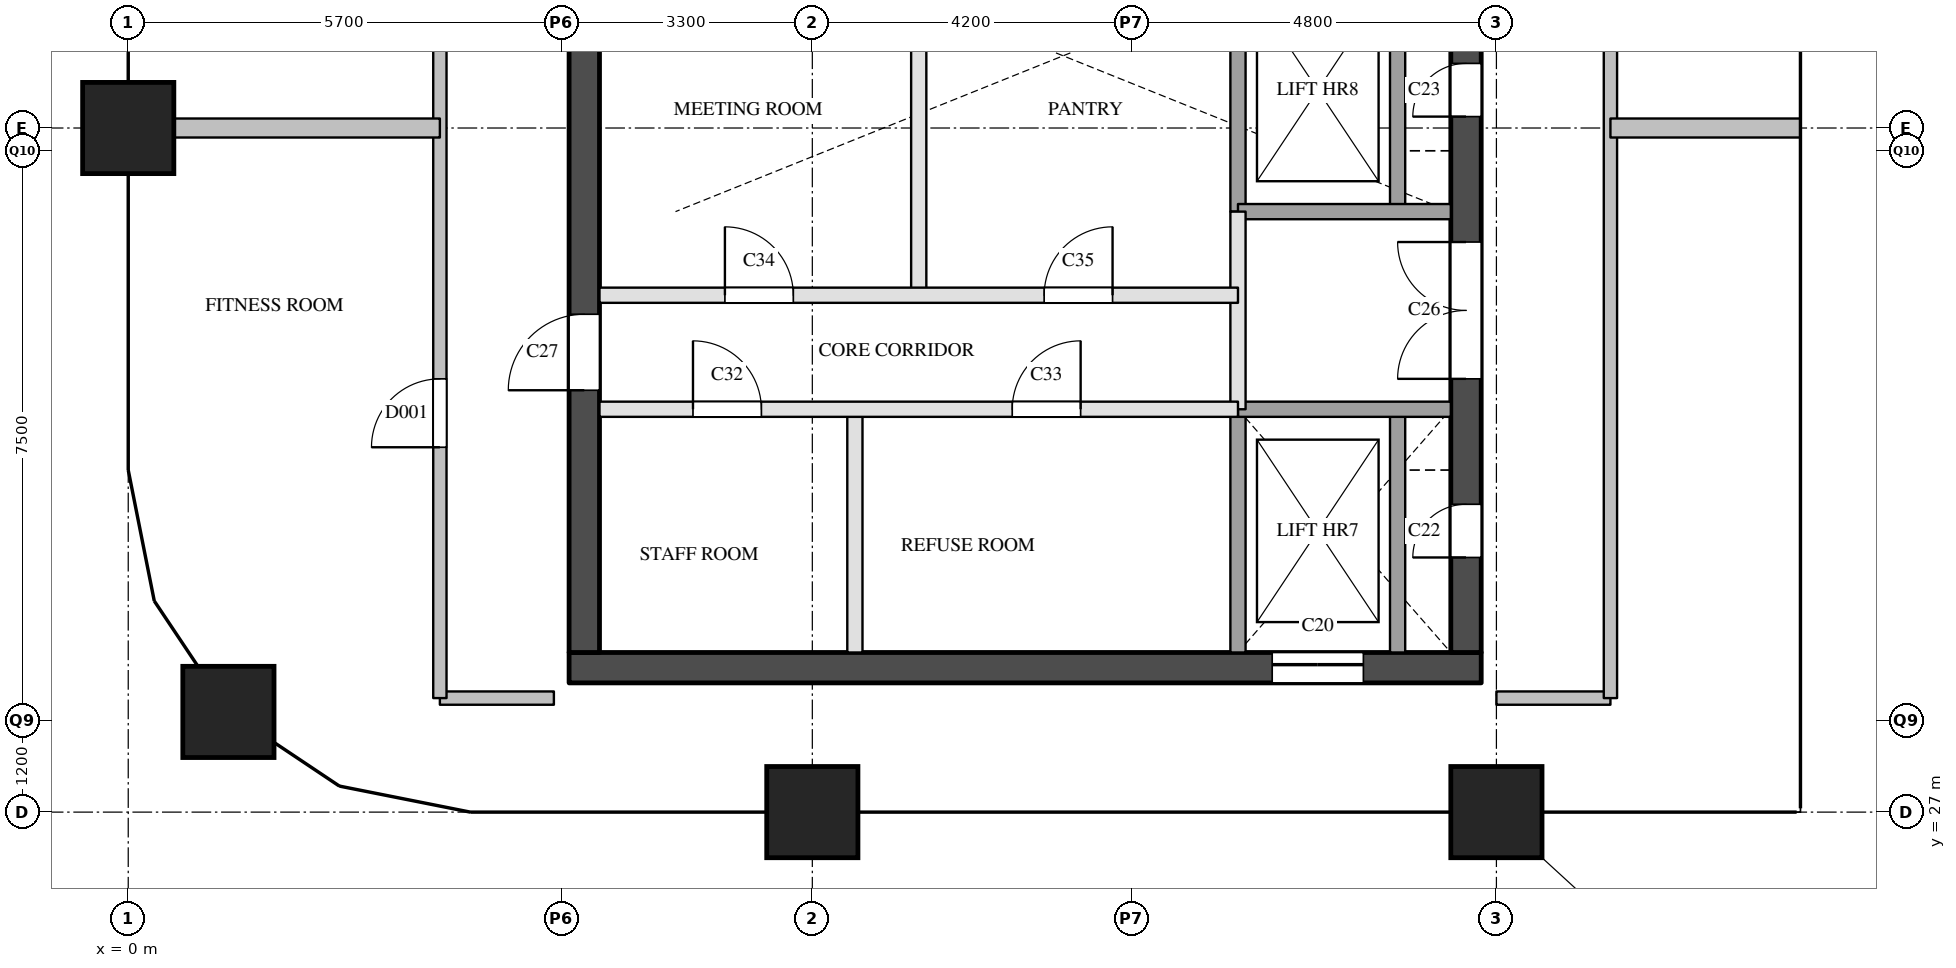
"""IFC4 building model, lengths in metres.
Left out: names, types, materials, properties, quantities, classifications, styles, units other than length and angle.
Written with IfcOpenShell. Run it as: python <this file> out.ifc"""

import sys

from ifc_helpers import new_model, si_unit, direction, frame, frame_2d, origin, origin_2d, place, context, subcontext, project, spatial, rectangle, extrude, element, fill, save


model = new_model("IFC4")
c1 = context("Model", 3, precision=1e-05, world=origin(), true_north=direction((0.0, 1.0)))
c2 = subcontext(c1, "Body", "Model", "MODEL_VIEW")
j1 = project(units=[si_unit("LENGTHUNIT", "METRE"), si_unit("PLANEANGLEUNIT", "RADIAN")], contexts=[c1])
p1 = place(None, origin())
s1 = spatial("IfcSite", under=j1, at=p1, CompositionType="ELEMENT")
p2 = place(p1, origin())
s2 = spatial("IfcBuilding", under=s1, at=p2, CompositionType="ELEMENT")
p3 = place(p2, frame((0.0, 0.0, 211.1)))
s3 = spatial("IfcBuildingStorey", under=s2, at=p3, CompositionType="ELEMENT", Elevation=211.1)
for number, where, z_axis, x_axis in (
    (1, (1.318, 28.318, 0.0), (0.0, 0.0, 1.0), (1.0, 0.0, 0.0)),
    (2, (0.0, 36.0, 0.0), (0.0, 0.0, 1.0), (1.0, 0.0, 0.0)),
    (3, (9.0, 27.0, 0.0), (0.0, 0.0, 1.0), (1.0, 0.0, 0.0)),
    (4, (18.0, 27.0, 0.0), (0.0, 0.0, 1.0), (1.0, 0.0, 0.0)),
):
    element("IfcColumn", number, at=place(p3, frame(where, z_axis=z_axis, x_axis=x_axis)), inside=s3, PredefinedType="COLUMN", context=c2, shape_type="SweptSolid", body=[
        extrude(rectangle(XDim=1.2, YDim=1.2, at=origin_2d()), origin(), (0.0, 0.0, 1.0), 3.9),
    ])
p4 = place(p3, frame((5.8, 28.9, 0.0), z_axis=(0.0, 0.0, 1.0), x_axis=(1.0, 0.0, 0.0)))
e5 = element("IfcWall", 5, at=p4, inside=s3, PredefinedType="SHEAR", context=c2, shape_type="SweptSolid", body=[
    extrude(rectangle(XDim=12.0, YDim=0.4, at=frame_2d((6.0, 0.0))), origin(), (0.0, 0.0, 1.0), 3.6),
])
p5 = place(p4, frame((9.25, 0.0, 0.0)))
e6 = element("IfcOpeningElement", 6, at=p5, cuts=e5, PredefinedType="OPENING", context=c2, shape_type="SweptSolid", body=[
    extrude(rectangle(XDim=1.2, YDim=2.1, at=frame_2d((0.6, 1.05))), frame((0.0, 0.21, 0.0), z_axis=(0.0, -1.0, 0.0), x_axis=(1.0, 0.0, 0.0)), (0.0, 0.0, 1.0), 0.42),
])
p6 = place(p3, frame((6.0, 29.1, 0.0), z_axis=(0.0, 0.0, 1.0), x_axis=(0.0, 1.0, 0.0)))
e7 = element("IfcWall", 7, at=p6, inside=s3, PredefinedType="SHEAR", context=c2, shape_type="SweptSolid", body=[
    extrude(rectangle(XDim=20.3, YDim=0.4, at=frame_2d((10.15, 0.0))), origin(), (0.0, 0.0, 1.0), 3.6),
])
p7 = place(p6, frame((3.45, 0.0, 0.0)))
e8 = element("IfcOpeningElement", 8, at=p7, cuts=e7, PredefinedType="OPENING", context=c2, shape_type="SweptSolid", body=[
    extrude(rectangle(XDim=1.0, YDim=2.1, at=frame_2d((0.5, 1.05))), frame((0.0, 0.21, 0.0), z_axis=(0.0, -1.0, 0.0), x_axis=(1.0, 0.0, 0.0)), (0.0, 0.0, 1.0), 0.42),
])
p8 = place(p6, frame((16.4, 0.0, 0.0)))
e9 = element("IfcOpeningElement", 9, at=p8, cuts=e7, PredefinedType="OPENING", context=c2, shape_type="SweptSolid", body=[
    extrude(rectangle(XDim=1.0, YDim=2.1, at=frame_2d((0.5, 1.05))), frame((0.0, 0.21, 0.0), z_axis=(0.0, -1.0, 0.0), x_axis=(1.0, 0.0, 0.0)), (0.0, 0.0, 1.0), 0.42),
])
p9 = place(p3, frame((17.6, 29.1, 0.0), z_axis=(0.0, 0.0, 1.0), x_axis=(0.0, 1.0, 0.0)))
e10 = element("IfcWall", 10, at=p9, inside=s3, PredefinedType="SHEAR", context=c2, shape_type="SweptSolid", body=[
    extrude(rectangle(XDim=20.3, YDim=0.4, at=frame_2d((10.15, 0.0))), origin(), (0.0, 0.0, 1.0), 3.6),
])
p10 = place(p9, frame((1.25, 0.0, 0.0)))
e11 = element("IfcOpeningElement", 11, at=p10, cuts=e10, PredefinedType="OPENING", context=c2, shape_type="SweptSolid", body=[
    extrude(rectangle(XDim=0.7, YDim=2.1, at=frame_2d((0.35, 1.05))), frame((0.0, 0.21, 0.0), z_axis=(0.0, -1.0, 0.0), x_axis=(1.0, 0.0, 0.0)), (0.0, 0.0, 1.0), 0.42),
])
p11 = place(p9, frame((7.05, 0.0, 0.0)))
e12 = element("IfcOpeningElement", 12, at=p11, cuts=e10, PredefinedType="OPENING", context=c2, shape_type="SweptSolid", body=[
    extrude(rectangle(XDim=0.7, YDim=2.1, at=frame_2d((0.35, 1.05))), frame((0.0, 0.21, 0.0), z_axis=(0.0, -1.0, 0.0), x_axis=(1.0, 0.0, 0.0)), (0.0, 0.0, 1.0), 0.42),
])
p12 = place(p9, frame((3.6, 0.0, 0.0)))
e13 = element("IfcOpeningElement", 13, at=p12, cuts=e10, PredefinedType="OPENING", context=c2, shape_type="SweptSolid", body=[
    extrude(rectangle(XDim=1.8, YDim=2.1, at=frame_2d((0.9, 1.05))), frame((0.0, 0.21, 0.0), z_axis=(0.0, -1.0, 0.0), x_axis=(1.0, 0.0, 0.0)), (0.0, 0.0, 1.0), 0.42),
])
p13 = place(p3, frame((9.56, 29.1, 0.0), z_axis=(0.0, 0.0, 1.0), x_axis=(0.0, 1.0, 0.0)))
e14 = element("IfcWall", 14, at=p13, inside=s3, PredefinedType="PARTITIONING", context=c2, shape_type="SweptSolid", body=[
    extrude(rectangle(XDim=3.2, YDim=0.2, at=frame_2d((1.6, 0.0))), origin(), (0.0, 0.0, 1.0), 3.6),
])
p14 = place(p3, frame((10.4, 33.8, 0.0), z_axis=(0.0, 0.0, 1.0), x_axis=(0.0, 1.0, 0.0)))
e15 = element("IfcWall", 15, at=p14, inside=s3, PredefinedType="PARTITIONING", context=c2, shape_type="SweptSolid", body=[
    extrude(rectangle(XDim=4.3, YDim=0.2, at=frame_2d((2.15, 0.0))), origin(), (0.0, 0.0, 1.0), 3.6),
])
p15 = place(p3, frame((14.6, 32.3, 0.0), z_axis=(0.0, 0.0, 1.0), x_axis=(0.0, 1.0, 0.0)))
e16 = element("IfcWall", 16, at=p15, inside=s3, PredefinedType="PARTITIONING", context=c2, shape_type="SweptSolid", body=[
    extrude(rectangle(XDim=2.6, YDim=0.2, at=frame_2d((1.3, 0.0))), origin(), (0.0, 0.0, 1.0), 3.6),
])
p16 = place(p3, frame((14.6, 29.1, 0.0), z_axis=(0.0, 0.0, 1.0), x_axis=(0.0, 1.0, 0.0)))
e17 = element("IfcWall", 17, at=p16, inside=s3, PredefinedType="SOLIDWALL", context=c2, shape_type="SweptSolid", body=[
    extrude(rectangle(XDim=3.2, YDim=0.2, at=frame_2d((1.6, 0.0))), origin(), (0.0, 0.0, 1.0), 3.6),
])
p17 = place(p3, frame((14.6, 34.9, 0.0), z_axis=(0.0, 0.0, 1.0), x_axis=(0.0, 1.0, 0.0)))
e18 = element("IfcWall", 18, at=p17, inside=s3, PredefinedType="SOLIDWALL", context=c2, shape_type="SweptSolid", body=[
    extrude(rectangle(XDim=3.2, YDim=0.2, at=frame_2d((1.6, 0.0))), origin(), (0.0, 0.0, 1.0), 3.6),
])
p18 = place(p3, frame((16.7, 29.1, 0.0), z_axis=(0.0, 0.0, 1.0), x_axis=(0.0, 1.0, 0.0)))
e19 = element("IfcWall", 19, at=p18, inside=s3, PredefinedType="SOLIDWALL", context=c2, shape_type="SweptSolid", body=[
    extrude(rectangle(XDim=3.2, YDim=0.2, at=frame_2d((1.6, 0.0))), origin(), (0.0, 0.0, 1.0), 3.6),
])
p19 = place(p3, frame((16.7, 34.9, 0.0), z_axis=(0.0, 0.0, 1.0), x_axis=(0.0, 1.0, 0.0)))
e20 = element("IfcWall", 20, at=p19, inside=s3, PredefinedType="SOLIDWALL", context=c2, shape_type="SweptSolid", body=[
    extrude(rectangle(XDim=3.2, YDim=0.2, at=frame_2d((1.6, 0.0))), origin(), (0.0, 0.0, 1.0), 3.6),
])
p20 = place(p3, frame((6.2, 32.3, 0.0), z_axis=(0.0, 0.0, 1.0), x_axis=(1.0, 0.0, 0.0)))
e21 = element("IfcWall", 21, at=p20, inside=s3, PredefinedType="PARTITIONING", context=c2, shape_type="SweptSolid", body=[
    extrude(rectangle(XDim=8.4, YDim=0.2, at=frame_2d((4.2, 0.0))), origin(), (0.0, 0.0, 1.0), 3.6),
])
p21 = place(p20, frame((1.23, 0.0, 0.0)))
e22 = element("IfcOpeningElement", 22, at=p21, cuts=e21, PredefinedType="OPENING", context=c2, shape_type="SweptSolid", body=[
    extrude(rectangle(XDim=0.9, YDim=2.1, at=frame_2d((0.45, 1.05))), frame((0.0, 0.11, 0.0), z_axis=(0.0, -1.0, 0.0), x_axis=(1.0, 0.0, 0.0)), (0.0, 0.0, 1.0), 0.22),
])
p22 = place(p20, frame((5.43, 0.0, 0.0)))
e23 = element("IfcOpeningElement", 23, at=p22, cuts=e21, PredefinedType="OPENING", context=c2, shape_type="SweptSolid", body=[
    extrude(rectangle(XDim=0.9, YDim=2.1, at=frame_2d((0.45, 1.05))), frame((0.0, 0.11, 0.0), z_axis=(0.0, -1.0, 0.0), x_axis=(1.0, 0.0, 0.0)), (0.0, 0.0, 1.0), 0.22),
])
p23 = place(p3, frame((14.6, 32.3, 0.0), z_axis=(0.0, 0.0, 1.0), x_axis=(1.0, 0.0, 0.0)))
e24 = element("IfcWall", 24, at=p23, inside=s3, PredefinedType="SOLIDWALL", context=c2, shape_type="SweptSolid", body=[
    extrude(rectangle(XDim=2.8, YDim=0.2, at=frame_2d((1.4, 0.0))), origin(), (0.0, 0.0, 1.0), 3.6),
])
p24 = place(p3, frame((6.2, 33.8, 0.0), z_axis=(0.0, 0.0, 1.0), x_axis=(1.0, 0.0, 0.0)))
e25 = element("IfcWall", 25, at=p24, inside=s3, PredefinedType="PARTITIONING", context=c2, shape_type="SweptSolid", body=[
    extrude(rectangle(XDim=8.4, YDim=0.2, at=frame_2d((4.2, 0.0))), origin(), (0.0, 0.0, 1.0), 3.6),
])
p25 = place(p24, frame((1.65, 0.0, 0.0)))
e26 = element("IfcOpeningElement", 26, at=p25, cuts=e25, PredefinedType="OPENING", context=c2, shape_type="SweptSolid", body=[
    extrude(rectangle(XDim=0.9, YDim=2.1, at=frame_2d((0.45, 1.05))), frame((0.0, 0.11, 0.0), z_axis=(0.0, -1.0, 0.0), x_axis=(1.0, 0.0, 0.0)), (0.0, 0.0, 1.0), 0.22),
])
p26 = place(p24, frame((5.85, 0.0, 0.0)))
e27 = element("IfcOpeningElement", 27, at=p26, cuts=e25, PredefinedType="OPENING", context=c2, shape_type="SweptSolid", body=[
    extrude(rectangle(XDim=0.9, YDim=2.1, at=frame_2d((0.45, 1.05))), frame((0.0, 0.11, 0.0), z_axis=(0.0, -1.0, 0.0), x_axis=(1.0, 0.0, 0.0)), (0.0, 0.0, 1.0), 0.22),
])
p27 = place(p3, frame((14.6, 34.9, 0.0), z_axis=(0.0, 0.0, 1.0), x_axis=(1.0, 0.0, 0.0)))
e28 = element("IfcWall", 28, at=p27, inside=s3, PredefinedType="SOLIDWALL", context=c2, shape_type="SweptSolid", body=[
    extrude(rectangle(XDim=2.8, YDim=0.2, at=frame_2d((1.4, 0.0))), origin(), (0.0, 0.0, 1.0), 3.6),
])
for number, where, z_axis, x_axis in (
    (29, (4.1, 28.5, 0.0), (0.0, 0.0, 1.0), (1.0, 0.0, 0.0)),
    (30, (18.0, 28.5, 0.0), (0.0, 0.0, 1.0), (1.0, 0.0, 0.0)),
):
    element("IfcWall", number, at=place(p3, frame(where, z_axis=z_axis, x_axis=x_axis)), inside=s3, PredefinedType="PARTITIONING", context=c2, shape_type="SweptSolid", body=[
        extrude(rectangle(XDim=1.5, YDim=0.175, at=frame_2d((0.75, 0.0))), origin(), (0.0, 0.0, 1.0), 3.6),
    ])
p28 = place(p3, frame((4.1, 28.5, 0.0), z_axis=(0.0, 0.0, 1.0), x_axis=(0.0, 1.0, 0.0)))
e31 = element("IfcWall", 31, at=p28, inside=s3, PredefinedType="PARTITIONING", context=c2, shape_type="SweptSolid", body=[
    extrude(rectangle(XDim=23.0, YDim=0.175, at=frame_2d((11.5, 0.0))), origin(), (0.0, 0.0, 1.0), 3.6),
])
p29 = place(p28, frame((3.3, 0.0, 0.0)))
e32 = element("IfcOpeningElement", 32, at=p29, cuts=e31, PredefinedType="OPENING", context=c2, shape_type="SweptSolid", body=[
    extrude(rectangle(XDim=0.9, YDim=2.1, at=frame_2d((0.45, 1.05))), frame((0.0, 0.097, 0.0), z_axis=(0.0, -1.0, 0.0), x_axis=(1.0, 0.0, 0.0)), (0.0, 0.0, 1.0), 0.195),
])
p30 = place(p28, frame((14.8, 0.0, 0.0)))
e33 = element("IfcOpeningElement", 33, at=p30, cuts=e31, PredefinedType="OPENING", context=c2, shape_type="SweptSolid", body=[
    extrude(rectangle(XDim=0.9, YDim=2.1, at=frame_2d((0.45, 1.05))), frame((0.0, 0.097, 0.0), z_axis=(0.0, -1.0, 0.0), x_axis=(1.0, 0.0, 0.0)), (0.0, 0.0, 1.0), 0.195),
])
p31 = place(p3, frame((19.5, 28.5, 0.0), z_axis=(0.0, 0.0, 1.0), x_axis=(0.0, 1.0, 0.0)))
e34 = element("IfcWall", 34, at=p31, inside=s3, PredefinedType="PARTITIONING", context=c2, shape_type="SweptSolid", body=[
    extrude(rectangle(XDim=10.75, YDim=0.175, at=frame_2d((5.375, 0.0))), origin(), (0.0, 0.0, 1.0), 3.6),
])
p32 = place(p31, frame((8.625, 0.0, 0.0)))
e35 = element("IfcOpeningElement", 35, at=p32, cuts=e34, PredefinedType="OPENING", context=c2, shape_type="SweptSolid", body=[
    extrude(rectangle(XDim=1.0, YDim=2.1, at=frame_2d((0.5, 1.05))), frame((0.0, 0.097, 0.0), z_axis=(0.0, -1.0, 0.0), x_axis=(1.0, 0.0, 0.0)), (0.0, 0.0, 1.0), 0.195),
])
p33 = place(p3, frame((0.0, 36.0, 0.0), z_axis=(0.0, 0.0, 1.0), x_axis=(1.0, 0.0, 0.0)))
e36 = element("IfcWall", 36, at=p33, inside=s3, PredefinedType="PARTITIONING", context=c2, shape_type="SweptSolid", body=[
    extrude(rectangle(XDim=4.1, YDim=0.25, at=frame_2d((2.05, 0.0))), origin(), (0.0, 0.0, 1.0), 3.6),
])
p34 = place(p3, frame((19.5, 36.0, 0.0), z_axis=(0.0, 0.0, 1.0), x_axis=(1.0, 0.0, 0.0)))
e37 = element("IfcWall", 37, at=p34, inside=s3, PredefinedType="PARTITIONING", context=c2, shape_type="SweptSolid", body=[
    extrude(rectangle(XDim=2.5, YDim=0.25, at=frame_2d((1.25, 0.0))), origin(), (0.0, 0.0, 1.0), 3.6),
])
p35 = place(p5, origin())
e38 = element("IfcDoor", 38, at=p35, inside=s3, OperationType="SLIDING_TO_LEFT", PredefinedType="DOOR", context=c2, shape_type="SweptSolid", body=[
    extrude(rectangle(XDim=1.2, YDim=2.1, at=frame_2d((0.6, 1.05))), frame((0.0, 0.025, 0.0), z_axis=(0.0, -1.0, 0.0), x_axis=(1.0, 0.0, 0.0)), (0.0, 0.0, 1.0), 0.05),
])
fill(e6, e38)
p36 = place(p10, origin())
e39 = element("IfcDoor", 39, at=p36, inside=s3, OperationType="SINGLE_SWING_LEFT", PredefinedType="DOOR", context=c2, shape_type="SweptSolid", body=[
    extrude(rectangle(XDim=0.7, YDim=2.1, at=frame_2d((0.35, 1.05))), frame((0.0, 0.025, 0.0), z_axis=(0.0, -1.0, 0.0), x_axis=(1.0, 0.0, 0.0)), (0.0, 0.0, 1.0), 0.05),
])
fill(e11, e39)
p37 = place(p11, origin())
e40 = element("IfcDoor", 40, at=p37, inside=s3, OperationType="SINGLE_SWING_LEFT", PredefinedType="DOOR", context=c2, shape_type="SweptSolid", body=[
    extrude(rectangle(XDim=0.7, YDim=2.1, at=frame_2d((0.35, 1.05))), frame((0.0, 0.025, 0.0), z_axis=(0.0, -1.0, 0.0), x_axis=(1.0, 0.0, 0.0)), (0.0, 0.0, 1.0), 0.05),
])
fill(e12, e40)
p38 = place(p12, origin())
e41 = element("IfcDoor", 41, at=p38, inside=s3, OperationType="DOUBLE_DOOR_SINGLE_SWING", PredefinedType="DOOR", context=c2, shape_type="SweptSolid", body=[
    extrude(rectangle(XDim=1.8, YDim=2.1, at=frame_2d((0.9, 1.05))), frame((0.0, 0.025, 0.0), z_axis=(0.0, -1.0, 0.0), x_axis=(1.0, 0.0, 0.0)), (0.0, 0.0, 1.0), 0.05),
])
fill(e13, e41)
p39 = place(p7, origin())
e42 = element("IfcDoor", 42, at=p39, inside=s3, OperationType="SINGLE_SWING_LEFT", PredefinedType="DOOR", context=c2, shape_type="SweptSolid", body=[
    extrude(rectangle(XDim=1.0, YDim=2.1, at=frame_2d((0.5, 1.05))), frame((0.0, 0.025, 0.0), z_axis=(0.0, -1.0, 0.0), x_axis=(1.0, 0.0, 0.0)), (0.0, 0.0, 1.0), 0.05),
])
fill(e8, e42)
p40 = place(p21, origin())
e43 = element("IfcDoor", 43, at=p40, inside=s3, OperationType="SINGLE_SWING_LEFT", PredefinedType="DOOR", context=c2, shape_type="SweptSolid", body=[
    extrude(rectangle(XDim=0.9, YDim=2.1, at=frame_2d((0.45, 1.05))), frame((0.0, 0.025, 0.0), z_axis=(0.0, -1.0, 0.0), x_axis=(1.0, 0.0, 0.0)), (0.0, 0.0, 1.0), 0.05),
])
fill(e22, e43)
p41 = place(p22, origin())
e44 = element("IfcDoor", 44, at=p41, inside=s3, OperationType="SINGLE_SWING_RIGHT", PredefinedType="DOOR", context=c2, shape_type="SweptSolid", body=[
    extrude(rectangle(XDim=0.9, YDim=2.1, at=frame_2d((0.45, 1.05))), frame((0.0, 0.025, 0.0), z_axis=(0.0, -1.0, 0.0), x_axis=(1.0, 0.0, 0.0)), (0.0, 0.0, 1.0), 0.05),
])
fill(e23, e44)
p42 = place(p25, origin())
e45 = element("IfcDoor", 45, at=p42, inside=s3, OperationType="SINGLE_SWING_LEFT", PredefinedType="DOOR", context=c2, shape_type="SweptSolid", body=[
    extrude(rectangle(XDim=0.9, YDim=2.1, at=frame_2d((0.45, 1.05))), frame((0.0, 0.025, 0.0), z_axis=(0.0, -1.0, 0.0), x_axis=(1.0, 0.0, 0.0)), (0.0, 0.0, 1.0), 0.05),
])
fill(e26, e45)
p43 = place(p26, origin())
e46 = element("IfcDoor", 46, at=p43, inside=s3, OperationType="SINGLE_SWING_RIGHT", PredefinedType="DOOR", context=c2, shape_type="SweptSolid", body=[
    extrude(rectangle(XDim=0.9, YDim=2.1, at=frame_2d((0.45, 1.05))), frame((0.0, 0.025, 0.0), z_axis=(0.0, -1.0, 0.0), x_axis=(1.0, 0.0, 0.0)), (0.0, 0.0, 1.0), 0.05),
])
fill(e27, e46)
p44 = place(p29, origin())
e47 = element("IfcDoor", 47, at=p44, inside=s3, OperationType="SINGLE_SWING_LEFT", PredefinedType="DOOR", context=c2, shape_type="SweptSolid", body=[
    extrude(rectangle(XDim=0.9, YDim=2.1, at=frame_2d((0.45, 1.05))), frame((0.0, 0.025, 0.0), z_axis=(0.0, -1.0, 0.0), x_axis=(1.0, 0.0, 0.0)), (0.0, 0.0, 1.0), 0.05),
])
fill(e32, e47)
save(model, sys.argv[1])
